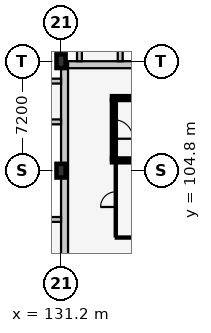
"""IFC4 building model, lengths in metres.
Left out: names, types, materials, properties, quantities, classifications, styles, units other than length and angle.
Written with IfcOpenShell. Run it as: python <this file> out.ifc"""

import sys

from ifc_helpers import new_model, si_unit, direction, frame, frame_2d, origin, origin_2d, place, context, subcontext, project, spatial, rectangle, extrude, element, fill, save


model = new_model("IFC4")
c1 = context("Model", 3, precision=1e-05, world=origin(), true_north=direction((0.0, 1.0)))
c2 = subcontext(c1, "Body", "Model", "MODEL_VIEW")
j1 = project(units=[si_unit("LENGTHUNIT", "METRE"), si_unit("PLANEANGLEUNIT", "RADIAN")], contexts=[c1])
p1 = place(None, origin())
s1 = spatial("IfcSite", under=j1, at=p1, CompositionType="ELEMENT")
p2 = place(p1, origin())
s2 = spatial("IfcBuilding", under=s1, at=p2, CompositionType="ELEMENT")
p3 = place(p2, frame((0.0, 0.0, 5.4)))
s3 = spatial("IfcBuildingStorey", under=s2, at=p3, CompositionType="ELEMENT", Elevation=5.4)
for number, where, z_axis, x_axis in (
    (1, (131.2, 104.8, 0.0), (0.0, 0.0, 1.0), (1.0, 0.0, 0.0)),
    (2, (131.2, 112.0, 0.0), (0.0, 0.0, 1.0), (1.0, 0.0, 0.0)),
):
    element("IfcColumn", number, at=place(p3, frame(where, z_axis=z_axis, x_axis=x_axis)), inside=s3, PredefinedType="COLUMN", context=c2, shape_type="SweptSolid", body=[
        extrude(rectangle(XDim=0.6, YDim=0.9, at=origin_2d()), origin(), (0.0, 0.0, 1.0), 4.2),
    ])
p4 = place(p3, frame((131.2, 111.77, 0.0), z_axis=(0.0, 0.0, 1.0), x_axis=(1.0, 0.0, 0.0)))
e3 = element("IfcWall", 3, at=p4, inside=s3, PredefinedType="SOLIDWALL", context=c2, shape_type="SweptSolid", body=[
    extrude(rectangle(XDim=28.8, YDim=0.46, at=frame_2d((14.4, 0.0))), origin(), (0.0, 0.0, 1.0), 3.245),
])
p5 = place(p3, frame((132.41, 112.0, 0.0), z_axis=(0.0, 0.0, 1.0), x_axis=(0.0, 1.0, 0.0)))
e4 = element("IfcWall", 4, at=p5, inside=s3, PredefinedType="SOLIDWALL", context=c2, shape_type="SweptSolid", body=[
    extrude(rectangle(XDim=1.793, YDim=0.32, at=frame_2d((0.896, 0.0))), origin(), (0.0, 0.0, 1.0), 3.93),
])
p6 = place(p3, frame((135.09, 112.0, 0.0), z_axis=(0.0, 0.0, 1.0), x_axis=(0.0, 1.0, 0.0)))
e5 = element("IfcWall", 5, at=p6, inside=s3, PredefinedType="SOLIDWALL", context=c2, shape_type="SweptSolid", body=[
    extrude(rectangle(XDim=1.35, YDim=0.32, at=frame_2d((0.675, 0.0))), origin(), (0.0, 0.0, 1.0), 3.93),
])
p7 = place(p3, frame((131.43, 83.2, 0.0), z_axis=(0.0, 0.0, 1.0), x_axis=(0.0, 1.0, 0.0)))
e6 = element("IfcWall", 6, at=p7, inside=s3, PredefinedType="SOLIDWALL", context=c2, shape_type="SweptSolid", body=[
    extrude(rectangle(XDim=28.8, YDim=0.46, at=frame_2d((14.4, 0.0))), origin(), (0.0, 0.0, 1.0), 3.205),
])
for number, where, z_axis, x_axis in (
    (7, (131.2, 101.59, 0.0), (0.0, 0.0, 1.0), (-1.0, 0.0, 0.0)),
    (8, (131.2, 108.01, 0.0), (0.0, 0.0, 1.0), (-1.0, 0.0, 0.0)),
):
    element("IfcWall", number, at=place(p3, frame(where, z_axis=z_axis, x_axis=x_axis)), inside=s3, PredefinedType="SOLIDWALL", context=c2, shape_type="SweptSolid", body=[
        extrude(rectangle(XDim=1.35, YDim=0.32, at=frame_2d((0.675, 0.0))), origin(), (0.0, 0.0, 1.0), 3.93),
    ])
p8 = place(p3, frame((131.2, 110.69, 0.0), z_axis=(0.0, 0.0, 1.0), x_axis=(-1.0, 0.0, 0.0)))
e9 = element("IfcWall", 9, at=p8, inside=s3, PredefinedType="SOLIDWALL", context=c2, shape_type="SweptSolid", body=[
    extrude(rectangle(XDim=1.793, YDim=0.32, at=frame_2d((0.896, 0.0))), origin(), (0.0, 0.0, 1.0), 3.93),
])
for number, where, z_axis, x_axis in (
    (10, (134.55, 105.475, 0.0), (0.0, 0.0, 1.0), (1.0, 0.0, 0.0)),
    (11, (143.45, 109.575, 0.0), (0.0, 0.0, 1.0), (-1.0, 0.0, 0.0)),
):
    element("IfcWall", number, at=place(p3, frame(where, z_axis=z_axis, x_axis=x_axis)), inside=s3, PredefinedType="SHEAR", context=c2, shape_type="SweptSolid", body=[
        extrude(rectangle(XDim=8.9, YDim=0.25, at=frame_2d((4.45, 0.0))), origin(), (0.0, 0.0, 1.0), 3.95),
    ])
p9 = place(p3, frame((134.675, 109.45, 0.0), z_axis=(0.0, 0.0, 1.0), x_axis=(0.0, -1.0, 0.0)))
e12 = element("IfcWall", 12, at=p9, inside=s3, PredefinedType="SHEAR", context=c2, shape_type="SweptSolid", body=[
    extrude(rectangle(XDim=3.85, YDim=0.25, at=frame_2d((1.925, 0.0))), origin(), (0.0, 0.0, 1.0), 3.95),
])
p10 = place(p9, frame((1.3, 0.0, 0.0)))
e13 = element("IfcOpeningElement", 13, at=p10, cuts=e12, PredefinedType="OPENING", context=c2, shape_type="SweptSolid", body=[
    extrude(rectangle(XDim=1.25, YDim=2.15, at=frame_2d((0.625, 1.075))), frame((0.0, 0.137, 0.0), z_axis=(0.0, -1.0, 0.0), x_axis=(1.0, 0.0, 0.0)), (0.0, 0.0, 1.0), 0.274),
])
p11 = place(p3, frame((134.8, 100.4, 0.0), z_axis=(0.0, 0.0, 1.0), x_axis=(1.0, 0.0, 0.0)))
e14 = element("IfcWall", 14, at=p11, inside=s3, PredefinedType="PARTITIONING", context=c2, shape_type="SweptSolid", body=[
    extrude(rectangle(XDim=2.6, YDim=0.14, at=frame_2d((1.3, 0.0))), origin(), (0.0, 0.0, 1.0), 3.95),
])
p12 = place(p3, frame((134.8, 100.48, 0.0), z_axis=(0.0, 0.0, 1.0), x_axis=(0.0, 1.0, 0.0)))
e15 = element("IfcWall", 15, at=p12, inside=s3, PredefinedType="PARTITIONING", context=c2, shape_type="SweptSolid", body=[
    extrude(rectangle(XDim=4.86, YDim=0.14, at=frame_2d((2.43, 0.0))), origin(), (0.0, 0.0, 1.0), 3.595),
])
p13 = place(p12, frame((1.93, 0.0, 0.0)))
e16 = element("IfcOpeningElement", 16, at=p13, cuts=e15, PredefinedType="OPENING", context=c2, shape_type="SweptSolid", body=[
    extrude(rectangle(XDim=1.0, YDim=2.1, at=frame_2d((0.5, 1.05))), frame((0.0, 0.082, 0.0), z_axis=(0.0, -1.0, 0.0), x_axis=(1.0, 0.0, 0.0)), (0.0, 0.0, 1.0), 0.164),
])
p14 = place(p10, origin())
e17 = element("IfcDoor", 17, at=p14, inside=s3, OperationType="SINGLE_SWING_RIGHT", PredefinedType="DOOR", context=c2, shape_type="SweptSolid", body=[
    extrude(rectangle(XDim=1.25, YDim=2.15, at=frame_2d((0.625, 1.075))), frame((0.0, 0.025, 0.0), z_axis=(0.0, -1.0, 0.0), x_axis=(1.0, 0.0, 0.0)), (0.0, 0.0, 1.0), 0.05),
])
fill(e13, e17)
p15 = place(p13, origin())
e18 = element("IfcDoor", 18, at=p15, inside=s3, OperationType="SINGLE_SWING_LEFT", PredefinedType="DOOR", context=c2, shape_type="SweptSolid", body=[
    extrude(rectangle(XDim=1.0, YDim=2.1, at=frame_2d((0.5, 1.05))), frame((0.0, 0.025, 0.0), z_axis=(0.0, -1.0, 0.0), x_axis=(1.0, 0.0, 0.0)), (0.0, 0.0, 1.0), 0.05),
])
fill(e16, e18)
save(model, sys.argv[1])
